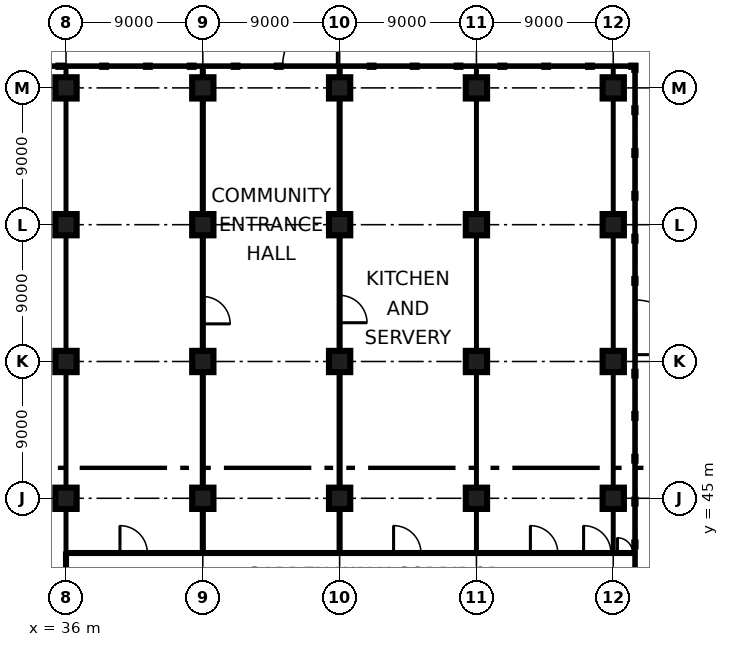
"""IFC4 building model, lengths in metres.
Left out: names, types, materials, properties, quantities, classifications, styles, units other than length and angle.
Written with IfcOpenShell. Run it as: python <this file> out.ifc"""

import sys

from ifc_helpers import new_model, si_unit, direction, frame, frame_2d, origin, origin_2d, place, context, subcontext, project, spatial, rectangle, extrude, element, fill, save


model = new_model("IFC4")
c1 = context("Model", 3, precision=1e-05, world=origin(), true_north=direction((0.0, 1.0)))
c2 = subcontext(c1, "Body", "Model", "MODEL_VIEW")
j1 = project(units=[si_unit("LENGTHUNIT", "METRE"), si_unit("PLANEANGLEUNIT", "RADIAN")], contexts=[c1])
p1 = place(None, origin())
s1 = spatial("IfcSite", under=j1, at=p1, CompositionType="ELEMENT")
p2 = place(p1, origin())
s2 = spatial("IfcBuilding", under=s1, at=p2, CompositionType="ELEMENT")
p3 = place(p2, origin())
s3 = spatial("IfcBuildingStorey", under=s2, at=p3, CompositionType="ELEMENT", Elevation=0.0)
for number, where, z_axis, x_axis in (
    (1, (36.0, 45.0, 0.0), (0.0, 0.0, 1.0), (1.0, 0.0, 0.0)),
    (2, (45.0, 45.0, 0.0), (0.0, 0.0, 1.0), (1.0, 0.0, 0.0)),
    (3, (54.0, 45.0, 0.0), (0.0, 0.0, 1.0), (1.0, 0.0, 0.0)),
    (4, (63.0, 45.0, 0.0), (0.0, 0.0, 1.0), (1.0, 0.0, 0.0)),
    (5, (72.0, 45.0, 0.0), (0.0, 0.0, 1.0), (1.0, 0.0, 0.0)),
    (6, (36.0, 54.0, 0.0), (0.0, 0.0, 1.0), (1.0, 0.0, 0.0)),
    (7, (45.0, 54.0, 0.0), (0.0, 0.0, 1.0), (1.0, 0.0, 0.0)),
    (8, (54.0, 54.0, 0.0), (0.0, 0.0, 1.0), (1.0, 0.0, 0.0)),
    (9, (63.0, 54.0, 0.0), (0.0, 0.0, 1.0), (1.0, 0.0, 0.0)),
    (10, (72.0, 54.0, 0.0), (0.0, 0.0, 1.0), (1.0, 0.0, 0.0)),
    (11, (36.0, 63.0, 0.0), (0.0, 0.0, 1.0), (1.0, 0.0, 0.0)),
    (12, (45.0, 63.0, 0.0), (0.0, 0.0, 1.0), (1.0, 0.0, 0.0)),
    (13, (54.0, 63.0, 0.0), (0.0, 0.0, 1.0), (1.0, 0.0, 0.0)),
    (14, (63.0, 63.0, 0.0), (0.0, 0.0, 1.0), (1.0, 0.0, 0.0)),
    (15, (72.0, 63.0, 0.0), (0.0, 0.0, 1.0), (1.0, 0.0, 0.0)),
    (16, (36.0, 72.0, 0.0), (0.0, 0.0, 1.0), (1.0, 0.0, 0.0)),
    (17, (45.0, 72.0, 0.0), (0.0, 0.0, 1.0), (1.0, 0.0, 0.0)),
    (18, (54.0, 72.0, 0.0), (0.0, 0.0, 1.0), (1.0, 0.0, 0.0)),
    (19, (63.0, 72.0, 0.0), (0.0, 0.0, 1.0), (1.0, 0.0, 0.0)),
    (20, (72.0, 72.0, 0.0), (0.0, 0.0, 1.0), (1.0, 0.0, 0.0)),
):
    element("IfcColumn", number, at=place(p3, frame(where, z_axis=z_axis, x_axis=x_axis)), inside=s3, PredefinedType="COLUMN", context=c2, shape_type="SweptSolid", body=[
        extrude(rectangle(XDim=1.4, YDim=1.4, at=origin_2d()), origin(), (0.0, 0.0, 1.0), 7.2),
    ])
p4 = place(p3, frame((73.425, 53.25, 0.0), z_axis=(0.0, 0.0, 1.0), x_axis=(0.0, 1.0, 0.0)))
e21 = element("IfcWall", 21, at=p4, inside=s3, PredefinedType="SOLIDWALL", context=c2, shape_type="SweptSolid", body=[
    extrude(rectangle(XDim=6.0, YDim=0.15, at=frame_2d((3.0, 0.0))), origin(), (0.0, 0.0, 1.0), 6.8),
])
p5 = place(p4, frame((1.2, 0.0, 0.0)))
e22 = element("IfcOpeningElement", 22, at=p5, cuts=e21, PredefinedType="OPENING", context=c2, shape_type="SweptSolid", body=[
    extrude(rectangle(XDim=3.6, YDim=2.8, at=frame_2d((1.8, 1.4))), frame((0.0, 0.085, 0.0), z_axis=(0.0, -1.0, 0.0), x_axis=(1.0, 0.0, 0.0)), (0.0, 0.0, 1.0), 0.17),
])
p6 = place(p3, frame((56.046, 73.425, 0.0), z_axis=(0.0, 0.0, 1.0), x_axis=(-1.0, 0.0, 0.0)))
e23 = element("IfcWall", 23, at=p6, inside=s3, PredefinedType="SOLIDWALL", context=c2, shape_type="SweptSolid", body=[
    extrude(rectangle(XDim=6.0, YDim=0.15, at=frame_2d((3.0, 0.0))), origin(), (0.0, 0.0, 1.0), 6.8),
])
p7 = place(p6, frame((2.196, 0.0, 0.0)))
e24 = element("IfcOpeningElement", 24, at=p7, cuts=e23, PredefinedType="OPENING", context=c2, shape_type="SweptSolid", body=[
    extrude(rectangle(XDim=3.6, YDim=2.8, at=frame_2d((1.8, 1.4))), frame((0.0, 0.085, 0.0), z_axis=(0.0, -1.0, 0.0), x_axis=(1.0, 0.0, 0.0)), (0.0, 0.0, 1.0), 0.17),
])
p8 = place(p3, frame((36.0, 38.5, 0.0), z_axis=(0.0, 0.0, 1.0), x_axis=(0.0, 1.0, 0.0)))
e25 = element("IfcWall", 25, at=p8, inside=s3, PredefinedType="PARTITIONING", context=c2, shape_type="SweptSolid", body=[
    extrude(rectangle(XDim=2.9, YDim=0.2, at=frame_2d((1.45, 0.0))), origin(), (0.0, 0.0, 1.0), 6.8),
])
p9 = place(p3, frame((36.0, 41.4, 0.0), z_axis=(0.0, 0.0, 1.0), x_axis=(0.0, 1.0, 0.0)))
e26 = element("IfcWall", 26, at=p9, inside=s3, PredefinedType="PARTITIONING", context=c2, shape_type="SweptSolid", body=[
    extrude(rectangle(XDim=32.025, YDim=0.125, at=frame_2d((16.013, 0.0))), origin(), (0.0, 0.0, 1.0), 6.8),
])
p10 = place(p3, frame((36.1, 41.4, 0.0), z_axis=(0.0, 0.0, 1.0), x_axis=(1.0, 0.0, 0.0)))
e27 = element("IfcWall", 27, at=p10, inside=s3, PredefinedType="PARTITIONING", context=c2, shape_type="SweptSolid", body=[
    extrude(rectangle(XDim=37.325, YDim=0.2, at=frame_2d((18.663, 0.0))), origin(), (0.0, 0.0, 1.0), 6.8),
])
p11 = place(p10, frame((3.45, 0.0, 0.0)))
e28 = element("IfcOpeningElement", 28, at=p11, cuts=e27, PredefinedType="OPENING", context=c2, shape_type="SweptSolid", body=[
    extrude(rectangle(XDim=1.8, YDim=2.1, at=frame_2d((0.9, 1.05))), frame((0.0, 0.11, 0.0), z_axis=(0.0, -1.0, 0.0), x_axis=(1.0, 0.0, 0.0)), (0.0, 0.0, 1.0), 0.22),
])
p12 = place(p10, frame((21.45, 0.0, 0.0)))
e29 = element("IfcOpeningElement", 29, at=p12, cuts=e27, PredefinedType="OPENING", context=c2, shape_type="SweptSolid", body=[
    extrude(rectangle(XDim=1.8, YDim=2.1, at=frame_2d((0.9, 1.05))), frame((0.0, 0.11, 0.0), z_axis=(0.0, -1.0, 0.0), x_axis=(1.0, 0.0, 0.0)), (0.0, 0.0, 1.0), 0.22),
])
p13 = place(p10, frame((30.45, 0.0, 0.0)))
e30 = element("IfcOpeningElement", 30, at=p13, cuts=e27, PredefinedType="OPENING", context=c2, shape_type="SweptSolid", body=[
    extrude(rectangle(XDim=1.8, YDim=2.1, at=frame_2d((0.9, 1.05))), frame((0.0, 0.11, 0.0), z_axis=(0.0, -1.0, 0.0), x_axis=(1.0, 0.0, 0.0)), (0.0, 0.0, 1.0), 0.22),
])
p14 = place(p10, frame((33.95, 0.0, 0.0)))
e31 = element("IfcOpeningElement", 31, at=p14, cuts=e27, PredefinedType="OPENING", context=c2, shape_type="SweptSolid", body=[
    extrude(rectangle(XDim=1.8, YDim=2.1, at=frame_2d((0.9, 1.05))), frame((0.0, 0.11, 0.0), z_axis=(0.0, -1.0, 0.0), x_axis=(1.0, 0.0, 0.0)), (0.0, 0.0, 1.0), 0.22),
])
p15 = place(p10, frame((36.175, 0.0, 0.0)))
e32 = element("IfcOpeningElement", 32, at=p15, cuts=e27, PredefinedType="OPENING", context=c2, shape_type="SweptSolid", body=[
    extrude(rectangle(XDim=1.0, YDim=2.1, at=frame_2d((0.5, 1.05))), frame((0.0, 0.11, 0.0), z_axis=(0.0, -1.0, 0.0), x_axis=(1.0, 0.0, 0.0)), (0.0, 0.0, 1.0), 0.22),
])
p16 = place(p3, frame((45.0, 41.5, 0.0), z_axis=(0.0, 0.0, 1.0), x_axis=(0.0, 1.0, 0.0)))
e33 = element("IfcWall", 33, at=p16, inside=s3, PredefinedType="PARTITIONING", context=c2, shape_type="SweptSolid", body=[
    extrude(rectangle(XDim=31.925, YDim=0.2, at=frame_2d((15.962, 0.0))), origin(), (0.0, 0.0, 1.0), 6.8),
])
p17 = place(p16, frame((14.975, 0.0, 0.0)))
e34 = element("IfcOpeningElement", 34, at=p17, cuts=e33, PredefinedType="OPENING", context=c2, shape_type="SweptSolid", body=[
    extrude(rectangle(XDim=1.8, YDim=2.1, at=frame_2d((0.9, 1.05))), frame((0.0, 0.11, 0.0), z_axis=(0.0, -1.0, 0.0), x_axis=(1.0, 0.0, 0.0)), (0.0, 0.0, 1.0), 0.22),
])
p18 = place(p3, frame((54.0, 41.5, 0.0), z_axis=(0.0, 0.0, 1.0), x_axis=(0.0, 1.0, 0.0)))
e35 = element("IfcWall", 35, at=p18, inside=s3, PredefinedType="PARTITIONING", context=c2, shape_type="SweptSolid", body=[
    extrude(rectangle(XDim=31.851, YDim=0.2, at=frame_2d((15.926, 0.0))), origin(), (0.0, 0.0, 1.0), 6.8),
])
p19 = place(p18, frame((15.05, 0.0, 0.0)))
e36 = element("IfcOpeningElement", 36, at=p19, cuts=e35, PredefinedType="OPENING", context=c2, shape_type="SweptSolid", body=[
    extrude(rectangle(XDim=1.8, YDim=2.1, at=frame_2d((0.9, 1.05))), frame((0.0, 0.11, 0.0), z_axis=(0.0, -1.0, 0.0), x_axis=(1.0, 0.0, 0.0)), (0.0, 0.0, 1.0), 0.22),
])
for number, where, z_axis, x_axis in (
    (37, (63.0, 41.5, 0.0), (0.0, 0.0, 1.0), (0.0, 1.0, 0.0)),
    (38, (72.0, 41.5, 0.0), (0.0, 0.0, 1.0), (0.0, 1.0, 0.0)),
):
    element("IfcWall", number, at=place(p3, frame(where, z_axis=z_axis, x_axis=x_axis)), inside=s3, PredefinedType="PARTITIONING", context=c2, shape_type="SweptSolid", body=[
        extrude(rectangle(XDim=31.925, YDim=0.125, at=frame_2d((15.962, 0.0))), origin(), (0.0, 0.0, 1.0), 6.8),
    ])
p20 = place(p5, frame((3.6, 0.0, 0.0), z_axis=(0.0, 0.0, 1.0), x_axis=(-1.0, 0.0, 0.0)))
e39 = element("IfcDoor", 39, at=p20, inside=s3, OperationType="DOUBLE_DOOR_SINGLE_SWING", PredefinedType="DOOR", context=c2, shape_type="SweptSolid", body=[
    extrude(rectangle(XDim=3.6, YDim=2.8, at=frame_2d((1.8, 1.4))), frame((0.0, 0.025, 0.0), z_axis=(0.0, -1.0, 0.0), x_axis=(1.0, 0.0, 0.0)), (0.0, 0.0, 1.0), 0.05),
])
fill(e22, e39)
p21 = place(p7, frame((3.6, 0.0, 0.0), z_axis=(0.0, 0.0, 1.0), x_axis=(-1.0, 0.0, 0.0)))
e40 = element("IfcDoor", 40, at=p21, inside=s3, OperationType="DOUBLE_DOOR_SINGLE_SWING", PredefinedType="DOOR", context=c2, shape_type="SweptSolid", body=[
    extrude(rectangle(XDim=3.6, YDim=2.8, at=frame_2d((1.8, 1.4))), frame((0.0, 0.025, 0.0), z_axis=(0.0, -1.0, 0.0), x_axis=(1.0, 0.0, 0.0)), (0.0, 0.0, 1.0), 0.05),
])
fill(e24, e40)
p22 = place(p17, frame((1.8, 0.0, 0.0), z_axis=(0.0, 0.0, 1.0), x_axis=(-1.0, 0.0, 0.0)))
e41 = element("IfcDoor", 41, at=p22, inside=s3, OperationType="DOUBLE_DOOR_SINGLE_SWING", PredefinedType="DOOR", context=c2, shape_type="SweptSolid", body=[
    extrude(rectangle(XDim=1.8, YDim=2.1, at=frame_2d((0.9, 1.05))), frame((0.0, 0.025, 0.0), z_axis=(0.0, -1.0, 0.0), x_axis=(1.0, 0.0, 0.0)), (0.0, 0.0, 1.0), 0.05),
])
fill(e34, e41)
p23 = place(p11, origin())
e42 = element("IfcDoor", 42, at=p23, inside=s3, OperationType="DOUBLE_DOOR_SINGLE_SWING", PredefinedType="DOOR", context=c2, shape_type="SweptSolid", body=[
    extrude(rectangle(XDim=1.8, YDim=2.1, at=frame_2d((0.9, 1.05))), frame((0.0, 0.025, 0.0), z_axis=(0.0, -1.0, 0.0), x_axis=(1.0, 0.0, 0.0)), (0.0, 0.0, 1.0), 0.05),
])
fill(e28, e42)
p24 = place(p19, frame((1.8, 0.0, 0.0), z_axis=(0.0, 0.0, 1.0), x_axis=(-1.0, 0.0, 0.0)))
e43 = element("IfcDoor", 43, at=p24, inside=s3, OperationType="DOUBLE_DOOR_SINGLE_SWING", PredefinedType="DOOR", context=c2, shape_type="SweptSolid", body=[
    extrude(rectangle(XDim=1.8, YDim=2.1, at=frame_2d((0.9, 1.05))), frame((0.0, 0.025, 0.0), z_axis=(0.0, -1.0, 0.0), x_axis=(1.0, 0.0, 0.0)), (0.0, 0.0, 1.0), 0.05),
])
fill(e36, e43)
p25 = place(p12, origin())
e44 = element("IfcDoor", 44, at=p25, inside=s3, OperationType="DOUBLE_DOOR_SINGLE_SWING", PredefinedType="DOOR", context=c2, shape_type="SweptSolid", body=[
    extrude(rectangle(XDim=1.8, YDim=2.1, at=frame_2d((0.9, 1.05))), frame((0.0, 0.025, 0.0), z_axis=(0.0, -1.0, 0.0), x_axis=(1.0, 0.0, 0.0)), (0.0, 0.0, 1.0), 0.05),
])
fill(e29, e44)
p26 = place(p13, origin())
e45 = element("IfcDoor", 45, at=p26, inside=s3, OperationType="DOUBLE_DOOR_SINGLE_SWING", PredefinedType="DOOR", context=c2, shape_type="SweptSolid", body=[
    extrude(rectangle(XDim=1.8, YDim=2.1, at=frame_2d((0.9, 1.05))), frame((0.0, 0.025, 0.0), z_axis=(0.0, -1.0, 0.0), x_axis=(1.0, 0.0, 0.0)), (0.0, 0.0, 1.0), 0.05),
])
fill(e30, e45)
p27 = place(p14, origin())
e46 = element("IfcDoor", 46, at=p27, inside=s3, OperationType="DOUBLE_DOOR_SINGLE_SWING", PredefinedType="DOOR", context=c2, shape_type="SweptSolid", body=[
    extrude(rectangle(XDim=1.8, YDim=2.1, at=frame_2d((0.9, 1.05))), frame((0.0, 0.025, 0.0), z_axis=(0.0, -1.0, 0.0), x_axis=(1.0, 0.0, 0.0)), (0.0, 0.0, 1.0), 0.05),
])
fill(e31, e46)
p28 = place(p15, origin())
e47 = element("IfcDoor", 47, at=p28, inside=s3, OperationType="SINGLE_SWING_LEFT", PredefinedType="DOOR", context=c2, shape_type="SweptSolid", body=[
    extrude(rectangle(XDim=1.0, YDim=2.1, at=frame_2d((0.5, 1.05))), frame((0.0, 0.025, 0.0), z_axis=(0.0, -1.0, 0.0), x_axis=(1.0, 0.0, 0.0)), (0.0, 0.0, 1.0), 0.05),
])
fill(e32, e47)
save(model, sys.argv[1])
